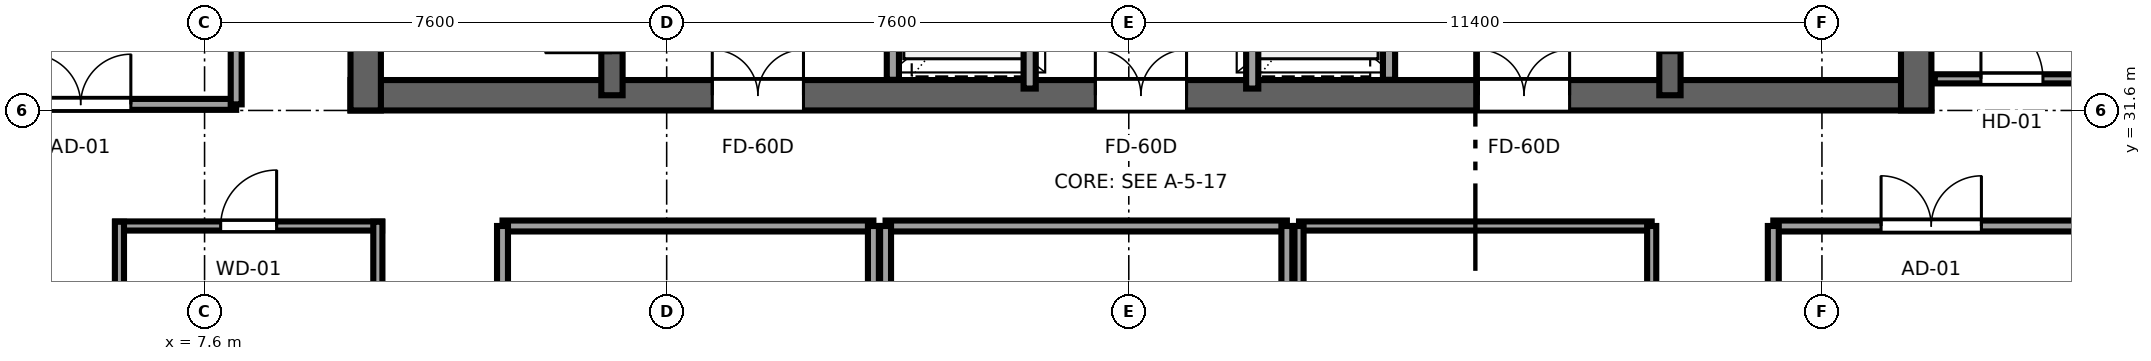
"""IFC4 building model, lengths in metres.
Left out: names, types, materials, properties, quantities, classifications, styles, units other than length and angle.
Written with IfcOpenShell. Run it as: python <this file> out.ifc"""

import sys

from ifc_helpers import new_model, si_unit, direction, frame, frame_2d, origin, place, context, subcontext, project, spatial, rectangle, extrude, source, transform, mapped, element, fill, save


model = new_model("IFC4")
c1 = context("Model", 3, precision=1e-05, world=origin(), true_north=direction((0.0, 1.0)))
c2 = subcontext(c1, "Body", "Model", "MODEL_VIEW")
j1 = project(units=[si_unit("LENGTHUNIT", "METRE"), si_unit("PLANEANGLEUNIT", "RADIAN")], contexts=[c1])
p1 = place(None, origin())
s1 = spatial("IfcSite", under=j1, at=p1, CompositionType="ELEMENT")
p2 = place(p1, origin())
s2 = spatial("IfcBuilding", under=s1, at=p2, CompositionType="ELEMENT")
p3 = place(p2, frame((0.0, 0.0, 255.85)))
s3 = spatial("IfcBuildingStorey", under=s2, at=p3, CompositionType="ELEMENT", Elevation=255.85)
p4 = place(p3, frame((10.0, 31.85, 0.0), z_axis=(0.0, 0.0, 1.0), x_axis=(1.0, 0.0, 0.0)))
e1 = element("IfcWall", 1, at=p4, inside=s3, PredefinedType="SHEAR", context=c2, shape_type="SweptSolid", body=[
    extrude(rectangle(XDim=26.0, YDim=0.5, at=frame_2d((13.0, 0.0))), origin(), (0.0, 0.0, 1.0), 3.55),
])
p5 = place(p4, frame((7.45, 0.0, 0.0), z_axis=(0.0, 0.0, 1.0), x_axis=(-1.0, 0.0, 0.0)))
e2 = element("IfcOpeningElement", 2, at=p5, cuts=e1, PredefinedType="OPENING", context=c2, shape_type="SweptSolid", body=[
    extrude(rectangle(XDim=1.5, YDim=2.04, at=frame_2d((0.75, 1.02))), frame((0.0, 0.26, 0.0), z_axis=(0.0, -1.0, 0.0), x_axis=(1.0, 0.0, 0.0)), (0.0, 0.0, 1.0), 0.52),
])
p6 = place(p4, frame((13.75, 0.0, 0.0), z_axis=(0.0, 0.0, 1.0), x_axis=(-1.0, 0.0, 0.0)))
e3 = element("IfcOpeningElement", 3, at=p6, cuts=e1, PredefinedType="OPENING", context=c2, shape_type="SweptSolid", body=[
    extrude(rectangle(XDim=1.5, YDim=2.04, at=frame_2d((0.75, 1.02))), frame((0.0, 0.26, 0.0), z_axis=(0.0, -1.0, 0.0), x_axis=(1.0, 0.0, 0.0)), (0.0, 0.0, 1.0), 0.52),
])
p7 = place(p4, frame((20.05, 0.0, 0.0), z_axis=(0.0, 0.0, 1.0), x_axis=(-1.0, 0.0, 0.0)))
e4 = element("IfcOpeningElement", 4, at=p7, cuts=e1, PredefinedType="OPENING", context=c2, shape_type="SweptSolid", body=[
    extrude(rectangle(XDim=1.5, YDim=2.04, at=frame_2d((0.75, 1.02))), frame((0.0, 0.26, 0.0), z_axis=(0.0, -1.0, 0.0), x_axis=(1.0, 0.0, 0.0)), (0.0, 0.0, 1.0), 0.52),
])
for number, where, z_axis, x_axis in (
    (5, (10.25, 31.6, 0.0), (0.0, 0.0, 1.0), (0.0, 1.0, 0.0)),
    (6, (35.75, 31.6, 0.0), (0.0, 0.0, 1.0), (0.0, 1.0, 0.0)),
):
    element("IfcWall", number, at=place(p3, frame(where, z_axis=z_axis, x_axis=x_axis)), inside=s3, PredefinedType="SHEAR", context=c2, shape_type="SweptSolid", body=[
        extrude(rectangle(XDim=13.6, YDim=0.5, at=frame_2d((6.8, 0.0))), origin(), (0.0, 0.0, 1.0), 3.55),
    ])
p8 = place(p3, frame((14.3, 31.85, 0.0), z_axis=(0.0, 0.0, 1.0), x_axis=(0.0, 1.0, 0.0)))
e7 = element("IfcWall", 7, at=p8, inside=s3, PredefinedType="SHEAR", context=c2, shape_type="SweptSolid", body=[
    extrude(rectangle(XDim=13.1, YDim=0.35, at=frame_2d((6.55, 0.0))), origin(), (0.0, 0.0, 1.0), 3.55),
])
p9 = place(p8, frame((0.7, 0.0, 0.0)))
e8 = element("IfcOpeningElement", 8, at=p9, cuts=e7, PredefinedType="OPENING", context=c2, shape_type="SweptSolid", body=[
    extrude(rectangle(XDim=1.1, YDim=2.12, at=frame_2d((0.55, 1.06))), frame((0.0, 0.185, 0.0), z_axis=(0.0, -1.0, 0.0), x_axis=(1.0, 0.0, 0.0)), (0.0, 0.0, 1.0), 0.37),
])
p10 = place(p3, frame((31.7, 31.85, 0.0), z_axis=(0.0, 0.0, 1.0), x_axis=(0.0, 1.0, 0.0)))
e9 = element("IfcWall", 9, at=p10, inside=s3, PredefinedType="SHEAR", context=c2, shape_type="SweptSolid", body=[
    extrude(rectangle(XDim=13.1, YDim=0.35, at=frame_2d((6.55, 0.0))), origin(), (0.0, 0.0, 1.0), 3.55),
])
p11 = place(p10, frame((1.8, 0.0, 0.0), z_axis=(0.0, 0.0, 1.0), x_axis=(-1.0, 0.0, 0.0)))
e10 = element("IfcOpeningElement", 10, at=p11, cuts=e9, PredefinedType="OPENING", context=c2, shape_type="SweptSolid", body=[
    extrude(rectangle(XDim=1.1, YDim=2.12, at=frame_2d((0.55, 1.06))), frame((0.0, 0.185, 0.0), z_axis=(0.0, -1.0, 0.0), x_axis=(1.0, 0.0, 0.0)), (0.0, 0.0, 1.0), 0.37),
])
for number, where, z_axis, x_axis in (
    (11, (18.92, 32.104, 0.0), (0.0, 0.0, 1.0), (0.0, 1.0, 0.0)),
    (12, (27.08, 32.104, 0.0), (0.0, 0.0, 1.0), (0.0, 1.0, 0.0)),
):
    element("IfcWall", number, at=place(p3, frame(where, z_axis=z_axis, x_axis=x_axis)), inside=s3, PredefinedType="SOLIDWALL", context=c2, shape_type="SweptSolid", body=[
        extrude(rectangle(XDim=4.046, YDim=0.2, at=frame_2d((2.023, 0.0))), origin(), (0.0, 0.0, 1.0), 3.37),
    ])
p12 = place(p3, frame((21.17, 31.96, 0.0), z_axis=(0.0, 0.0, 1.0), x_axis=(0.0, 1.0, 0.0)))
e13 = element("IfcWall", 13, at=p12, inside=s3, PredefinedType="SOLIDWALL", context=c2, shape_type="SweptSolid", body=[
    extrude(rectangle(XDim=5.08, YDim=0.2, at=frame_2d((2.54, 0.0))), origin(), (0.0, 0.0, 1.0), 3.37),
])
p13 = place(p12, frame((0.74, 0.0, 0.0)))
e14 = element("IfcOpeningElement", 14, at=p13, cuts=e13, PredefinedType="OPENING", context=c2, shape_type="SweptSolid", body=[
    extrude(rectangle(XDim=1.1, YDim=2.12, at=frame_2d((0.55, 1.06))), frame((0.0, 0.11, 0.0), z_axis=(0.0, -1.0, 0.0), x_axis=(1.0, 0.0, 0.0)), (0.0, 0.0, 1.0), 0.22),
])
p14 = place(p12, frame((3.24, 0.0, 0.0)))
e15 = element("IfcOpeningElement", 15, at=p14, cuts=e13, PredefinedType="OPENING", context=c2, shape_type="SweptSolid", body=[
    extrude(rectangle(XDim=1.1, YDim=2.12, at=frame_2d((0.55, 1.06))), frame((0.0, 0.11, 0.0), z_axis=(0.0, -1.0, 0.0), x_axis=(1.0, 0.0, 0.0)), (0.0, 0.0, 1.0), 0.22),
])
p15 = place(p3, frame((24.83, 31.96, 0.0), z_axis=(0.0, 0.0, 1.0), x_axis=(0.0, 1.0, 0.0)))
e16 = element("IfcWall", 16, at=p15, inside=s3, PredefinedType="SOLIDWALL", context=c2, shape_type="SweptSolid", body=[
    extrude(rectangle(XDim=5.08, YDim=0.2, at=frame_2d((2.54, 0.0))), origin(), (0.0, 0.0, 1.0), 3.37),
])
p16 = place(p15, frame((0.74, 0.0, 0.0)))
e17 = element("IfcOpeningElement", 17, at=p16, cuts=e16, PredefinedType="OPENING", context=c2, shape_type="SweptSolid", body=[
    extrude(rectangle(XDim=1.1, YDim=2.12, at=frame_2d((0.55, 1.06))), frame((0.0, 0.11, 0.0), z_axis=(0.0, -1.0, 0.0), x_axis=(1.0, 0.0, 0.0)), (0.0, 0.0, 1.0), 0.22),
])
p17 = place(p15, frame((3.24, 0.0, 0.0)))
e18 = element("IfcOpeningElement", 18, at=p17, cuts=e16, PredefinedType="OPENING", context=c2, shape_type="SweptSolid", body=[
    extrude(rectangle(XDim=1.1, YDim=2.12, at=frame_2d((0.55, 1.06))), frame((0.0, 0.11, 0.0), z_axis=(0.0, -1.0, 0.0), x_axis=(1.0, 0.0, 0.0)), (0.0, 0.0, 1.0), 0.22),
])
p18 = place(p3, frame((12.5, 29.7, 0.0), z_axis=(0.0, 0.0, 1.0), x_axis=(1.0, 0.0, 0.0)))
e19 = element("IfcWall", 19, at=p18, inside=s3, PredefinedType="PARTITIONING", context=c2, shape_type="SweptSolid", body=[
    extrude(rectangle(XDim=6.1, YDim=0.18, at=frame_2d((3.05, 0.0))), origin(), (0.0, 0.0, 1.0), 3.37),
])
for number, where, z_axis, x_axis in (
    (20, (12.5, 22.5, 0.0), (0.0, 0.0, 1.0), (0.0, 1.0, 0.0)),
    (21, (18.6, 22.5, 0.0), (0.0, 0.0, 1.0), (0.0, 1.0, 0.0)),
):
    element("IfcWall", number, at=place(p3, frame(where, z_axis=z_axis, x_axis=x_axis)), inside=s3, PredefinedType="PARTITIONING", context=c2, shape_type="SweptSolid", body=[
        extrude(rectangle(XDim=7.2, YDim=0.18, at=frame_2d((3.6, 0.0))), origin(), (0.0, 0.0, 1.0), 3.37),
    ])
p19 = place(p3, frame((18.8, 29.7, 0.0), z_axis=(0.0, 0.0, 1.0), x_axis=(1.0, 0.0, 0.0)))
e22 = element("IfcWall", 22, at=p19, inside=s3, PredefinedType="PARTITIONING", context=c2, shape_type="SweptSolid", body=[
    extrude(rectangle(XDim=6.6, YDim=0.18, at=frame_2d((3.3, 0.0))), origin(), (0.0, 0.0, 1.0), 3.37),
])
for number, where, z_axis, x_axis in (
    (23, (18.8, 22.5, 0.0), (0.0, 0.0, 1.0), (0.0, 1.0, 0.0)),
    (24, (25.4, 22.5, 0.0), (0.0, 0.0, 1.0), (0.0, 1.0, 0.0)),
):
    element("IfcWall", number, at=place(p3, frame(where, z_axis=z_axis, x_axis=x_axis)), inside=s3, PredefinedType="PARTITIONING", context=c2, shape_type="SweptSolid", body=[
        extrude(rectangle(XDim=7.2, YDim=0.18, at=frame_2d((3.6, 0.0))), origin(), (0.0, 0.0, 1.0), 3.37),
    ])
p20 = place(p3, frame((25.6, 29.7, 0.0), z_axis=(0.0, 0.0, 1.0), x_axis=(1.0, 0.0, 0.0)))
e25 = element("IfcWall", 25, at=p20, inside=s3, PredefinedType="PARTITIONING", context=c2, shape_type="SweptSolid", body=[
    extrude(rectangle(XDim=5.8, YDim=0.15, at=frame_2d((2.9, 0.0))), origin(), (0.0, 0.0, 1.0), 3.37),
])
for number, where, z_axis, x_axis in (
    (26, (25.6, 22.5, 0.0), (0.0, 0.0, 1.0), (0.0, 1.0, 0.0)),
    (27, (31.4, 22.5, 0.0), (0.0, 0.0, 1.0), (0.0, 1.0, 0.0)),
):
    element("IfcWall", number, at=place(p3, frame(where, z_axis=z_axis, x_axis=x_axis)), inside=s3, PredefinedType="PARTITIONING", context=c2, shape_type="SweptSolid", body=[
        extrude(rectangle(XDim=7.2, YDim=0.15, at=frame_2d((3.6, 0.0))), origin(), (0.0, 0.0, 1.0), 3.37),
    ])
p21 = place(p3, frame((6.13, 29.7, 0.0), z_axis=(0.0, 0.0, 1.0), x_axis=(1.0, 0.0, 0.0)))
e28 = element("IfcWall", 28, at=p21, inside=s3, PredefinedType="PARTITIONING", context=c2, shape_type="SweptSolid", body=[
    extrude(rectangle(XDim=4.39, YDim=0.15, at=frame_2d((2.195, 0.0))), origin(), (0.0, 0.0, 1.0), 3.37),
])
p22 = place(p21, frame((1.735, 0.0, 0.0)))
e29 = element("IfcOpeningElement", 29, at=p22, cuts=e28, PredefinedType="OPENING", context=c2, shape_type="SweptSolid", body=[
    extrude(rectangle(XDim=0.92, YDim=2.01, at=frame_2d((0.46, 1.005))), frame((0.0, 0.085, 0.0), z_axis=(0.0, -1.0, 0.0), x_axis=(1.0, 0.0, 0.0)), (0.0, 0.0, 1.0), 0.17),
])
for number, where, z_axis, x_axis in (
    (30, (6.2, 26.43, 0.0), (0.0, 0.0, 1.0), (0.0, 1.0, 0.0)),
    (31, (10.45, 26.43, 0.0), (0.0, 0.0, 1.0), (0.0, 1.0, 0.0)),
):
    element("IfcWall", number, at=place(p3, frame(where, z_axis=z_axis, x_axis=x_axis)), inside=s3, PredefinedType="PARTITIONING", context=c2, shape_type="SweptSolid", body=[
        extrude(rectangle(XDim=3.34, YDim=0.15, at=frame_2d((1.67, 0.0))), origin(), (0.0, 0.0, 1.0), 3.37),
    ])
p23 = place(p3, frame((3.005, 31.7, 0.0), z_axis=(0.0, 0.0, 1.0), x_axis=(1.0, 0.0, 0.0)))
e32 = element("IfcWall", 32, at=p23, inside=s3, PredefinedType="PARTITIONING", context=c2, shape_type="SweptSolid", body=[
    extrude(rectangle(XDim=5.115, YDim=0.18, at=frame_2d((2.558, 0.0))), origin(), (0.0, 0.0, 1.0), 3.37),
])
p24 = place(p23, frame((1.732, 0.0, 0.0)))
e33 = element("IfcOpeningElement", 33, at=p24, cuts=e32, PredefinedType="OPENING", context=c2, shape_type="SweptSolid", body=[
    extrude(rectangle(XDim=1.65, YDim=2.15, at=frame_2d((0.825, 1.075))), frame((0.0, 0.1, 0.0), z_axis=(0.0, -1.0, 0.0), x_axis=(1.0, 0.0, 0.0)), (0.0, 0.0, 1.0), 0.2),
])
p25 = place(p3, frame((8.12, 31.7, 0.0), z_axis=(0.0, 0.0, 1.0), x_axis=(0.0, 1.0, 0.0)))
e34 = element("IfcWall", 34, at=p25, inside=s3, PredefinedType="PARTITIONING", context=c2, shape_type="SweptSolid", body=[
    extrude(rectangle(XDim=6.1, YDim=0.18, at=frame_2d((3.05, 0.0))), origin(), (0.0, 0.0, 1.0), 3.37),
])
p26 = place(p3, frame((36.055, 32.12, 0.0), z_axis=(0.0, 0.0, 1.0), x_axis=(1.0, 0.0, 0.0)))
e35 = element("IfcWall", 35, at=p26, inside=s3, PredefinedType="PARTITIONING", context=c2, shape_type="SweptSolid", body=[
    extrude(rectangle(XDim=2.54, YDim=0.15, at=frame_2d((1.27, 0.0))), origin(), (0.0, 0.0, 1.0), 3.37),
])
p27 = place(p26, frame((0.76, 0.0, 0.0)))
e36 = element("IfcOpeningElement", 36, at=p27, cuts=e35, PredefinedType="OPENING", context=c2, shape_type="SweptSolid", body=[
    extrude(rectangle(XDim=1.02, YDim=2.03, at=frame_2d((0.51, 1.015))), frame((0.0, 0.085, 0.0), z_axis=(0.0, -1.0, 0.0), x_axis=(1.0, 0.0, 0.0)), (0.0, 0.0, 1.0), 0.17),
])
p28 = place(p3, frame((33.4, 29.7, 0.0), z_axis=(0.0, 0.0, 1.0), x_axis=(1.0, 0.0, 0.0)))
e37 = element("IfcWall", 37, at=p28, inside=s3, PredefinedType="PARTITIONING", context=c2, shape_type="SweptSolid", body=[
    extrude(rectangle(XDim=5.195, YDim=0.18, at=frame_2d((2.598, 0.0))), origin(), (0.0, 0.0, 1.0), 3.37),
])
p29 = place(p28, frame((1.772, 0.0, 0.0)))
e38 = element("IfcOpeningElement", 38, at=p29, cuts=e37, PredefinedType="OPENING", context=c2, shape_type="SweptSolid", body=[
    extrude(rectangle(XDim=1.65, YDim=2.15, at=frame_2d((0.825, 1.075))), frame((0.0, 0.1, 0.0), z_axis=(0.0, -1.0, 0.0), x_axis=(1.0, 0.0, 0.0)), (0.0, 0.0, 1.0), 0.2),
])
p30 = place(p3, frame((33.4, 21.9, 0.0), z_axis=(0.0, 0.0, 1.0), x_axis=(0.0, 1.0, 0.0)))
e39 = element("IfcWall", 39, at=p30, inside=s3, PredefinedType="PARTITIONING", context=c2, shape_type="SweptSolid", body=[
    extrude(rectangle(XDim=7.8, YDim=0.18, at=frame_2d((3.9, 0.0))), origin(), (0.0, 0.0, 1.0), 3.37),
])
m1 = source(origin(), c2, "Body", "SweptSolid", [
    extrude(rectangle(XDim=1.1, YDim=2.12, at=frame_2d((0.55, 1.06))), frame((0.0, 0.025, 0.0), z_axis=(0.0, -1.0, 0.0), x_axis=(1.0, 0.0, 0.0)), (0.0, 0.0, 1.0), 0.05),
])
p31 = place(p9, origin())
e40 = element("IfcDoor", 40, at=p31, inside=s3, OperationType="SINGLE_SWING_LEFT", PredefinedType="DOOR", context=c2, shape_type="MappedRepresentation", body=[
    mapped(m1, transform((0.0, 0.0, 0.0), x_axis=(1.0, 0.0, 0.0), y_axis=(0.0, 1.0, 0.0), z_axis=(0.0, 0.0, 1.0), scale=1.0)),
])
fill(e8, e40)
p32 = place(p11, origin())
e41 = element("IfcDoor", 41, at=p32, inside=s3, OperationType="SINGLE_SWING_RIGHT", PredefinedType="DOOR", context=c2, shape_type="MappedRepresentation", body=[
    mapped(m1, transform((0.0, 0.0, 0.0), x_axis=(1.0, 0.0, 0.0), y_axis=(0.0, 1.0, 0.0), z_axis=(0.0, 0.0, 1.0), scale=1.0)),
])
fill(e10, e41)
m2 = source(origin(), c2, "Body", "SweptSolid", [
    extrude(rectangle(XDim=1.5, YDim=2.04, at=frame_2d((0.75, 1.02))), frame((0.0, 0.025, 0.0), z_axis=(0.0, -1.0, 0.0), x_axis=(1.0, 0.0, 0.0)), (0.0, 0.0, 1.0), 0.05),
])
p33 = place(p5, origin())
e42 = element("IfcDoor", 42, at=p33, inside=s3, OperationType="DOUBLE_DOOR_SINGLE_SWING", PredefinedType="DOOR", context=c2, shape_type="MappedRepresentation", body=[
    mapped(m2, transform((0.0, 0.0, 0.0), x_axis=(1.0, 0.0, 0.0), y_axis=(0.0, 1.0, 0.0), z_axis=(0.0, 0.0, 1.0), scale=1.0)),
])
fill(e2, e42)
p34 = place(p6, origin())
e43 = element("IfcDoor", 43, at=p34, inside=s3, OperationType="DOUBLE_DOOR_SINGLE_SWING", PredefinedType="DOOR", context=c2, shape_type="MappedRepresentation", body=[
    mapped(m2, transform((0.0, 0.0, 0.0), x_axis=(1.0, 0.0, 0.0), y_axis=(0.0, 1.0, 0.0), z_axis=(0.0, 0.0, 1.0), scale=1.0)),
])
fill(e3, e43)
p35 = place(p7, origin())
e44 = element("IfcDoor", 44, at=p35, inside=s3, OperationType="DOUBLE_DOOR_SINGLE_SWING", PredefinedType="DOOR", context=c2, shape_type="MappedRepresentation", body=[
    mapped(m2, transform((0.0, 0.0, 0.0), x_axis=(1.0, 0.0, 0.0), y_axis=(0.0, 1.0, 0.0), z_axis=(0.0, 0.0, 1.0), scale=1.0)),
])
fill(e4, e44)
m3 = source(origin(), c2, "Body", "SweptSolid", [
    extrude(rectangle(XDim=0.92, YDim=2.01, at=frame_2d((0.46, 1.005))), frame((0.0, 0.025, 0.0), z_axis=(0.0, -1.0, 0.0), x_axis=(1.0, 0.0, 0.0)), (0.0, 0.0, 1.0), 0.05),
])
p36 = place(p22, origin())
e45 = element("IfcDoor", 45, at=p36, inside=s3, OperationType="SINGLE_SWING_RIGHT", PredefinedType="DOOR", context=c2, shape_type="MappedRepresentation", body=[
    mapped(m3, transform((0.0, 0.0, 0.0), x_axis=(1.0, 0.0, 0.0), y_axis=(0.0, 1.0, 0.0), z_axis=(0.0, 0.0, 1.0), scale=1.0)),
])
fill(e29, e45)
m4 = source(origin(), c2, "Body", "SweptSolid", [
    extrude(rectangle(XDim=1.65, YDim=2.15, at=frame_2d((0.825, 1.075))), frame((0.0, 0.025, 0.0), z_axis=(0.0, -1.0, 0.0), x_axis=(1.0, 0.0, 0.0)), (0.0, 0.0, 1.0), 0.05),
])
p37 = place(p24, origin())
e46 = element("IfcDoor", 46, at=p37, inside=s3, OperationType="DOUBLE_DOOR_SINGLE_SWING", PredefinedType="DOOR", context=c2, shape_type="MappedRepresentation", body=[
    mapped(m4, transform((0.0, 0.0, 0.0), x_axis=(1.0, 0.0, 0.0), y_axis=(0.0, 1.0, 0.0), z_axis=(0.0, 0.0, 1.0), scale=1.0)),
])
fill(e33, e46)
m5 = source(origin(), c2, "Body", "SweptSolid", [
    extrude(rectangle(XDim=1.02, YDim=2.03, at=frame_2d((0.51, 1.015))), frame((0.0, 0.025, 0.0), z_axis=(0.0, -1.0, 0.0), x_axis=(1.0, 0.0, 0.0)), (0.0, 0.0, 1.0), 0.05),
])
p38 = place(p27, origin())
e47 = element("IfcDoor", 47, at=p38, inside=s3, OperationType="SINGLE_SWING_LEFT", PredefinedType="DOOR", context=c2, shape_type="MappedRepresentation", body=[
    mapped(m5, transform((0.0, 0.0, 0.0), x_axis=(1.0, 0.0, 0.0), y_axis=(0.0, 1.0, 0.0), z_axis=(0.0, 0.0, 1.0), scale=1.0)),
])
fill(e36, e47)
p39 = place(p29, origin())
e48 = element("IfcDoor", 48, at=p39, inside=s3, OperationType="DOUBLE_DOOR_SINGLE_SWING", PredefinedType="DOOR", context=c2, shape_type="MappedRepresentation", body=[
    mapped(m4, transform((0.0, 0.0, 0.0), x_axis=(1.0, 0.0, 0.0), y_axis=(0.0, 1.0, 0.0), z_axis=(0.0, 0.0, 1.0), scale=1.0)),
])
fill(e38, e48)
save(model, sys.argv[1])
